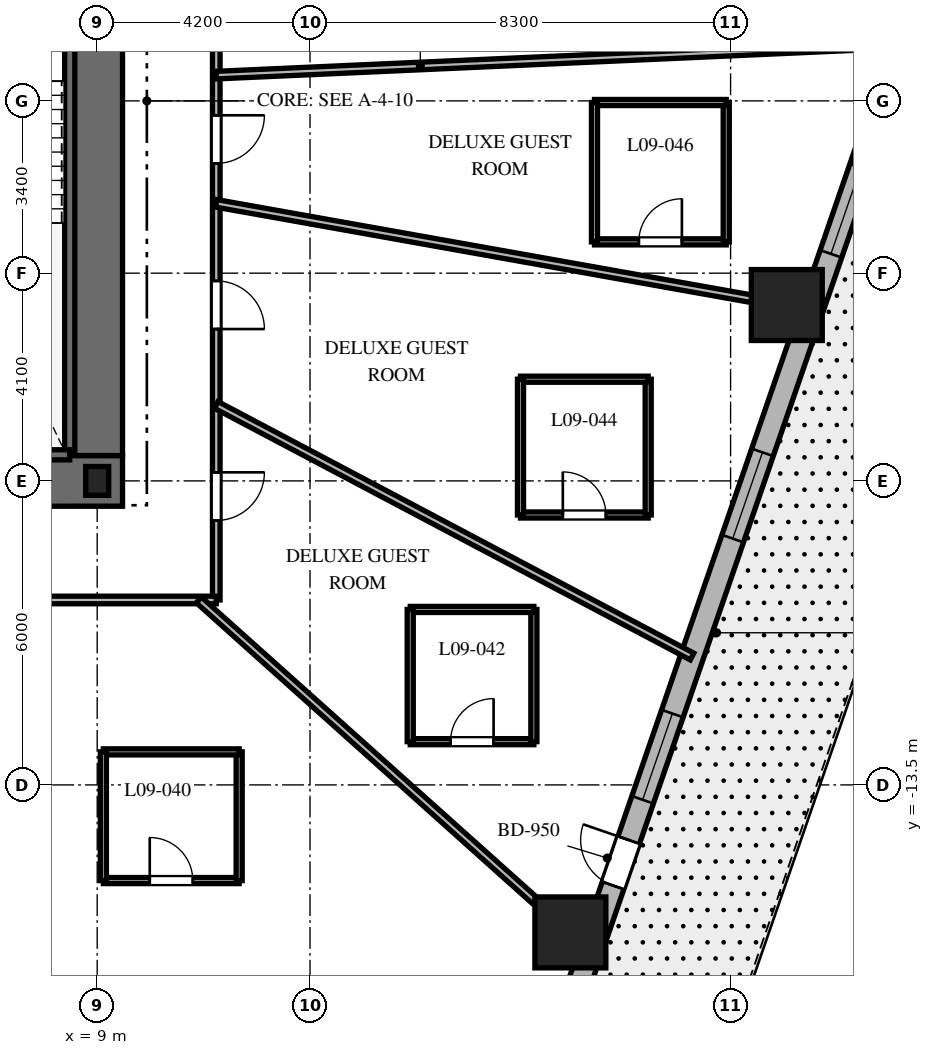
"""IFC4 building model, lengths in metres.
Left out: names, types, materials, properties, quantities, classifications, styles, units other than length and angle.
Written with IfcOpenShell. Run it as: python <this file> out.ifc"""

import sys

from ifc_helpers import new_model, si_unit, direction, frame, frame_2d, origin, origin_2d, place, context, subcontext, project, spatial, rectangle, i_section, extrude, element, fill, save


model = new_model("IFC4")
c1 = context("Model", 3, precision=1e-05, world=origin(), true_north=direction((0.0, 1.0)))
c2 = subcontext(c1, "Body", "Model", "MODEL_VIEW")
j1 = project(units=[si_unit("LENGTHUNIT", "METRE"), si_unit("PLANEANGLEUNIT", "RADIAN")], contexts=[c1])
p1 = place(None, origin())
s1 = spatial("IfcSite", under=j1, at=p1, CompositionType="ELEMENT")
p2 = place(p1, origin())
s2 = spatial("IfcBuilding", under=s1, at=p2, CompositionType="ELEMENT")
p3 = place(p2, frame((0.0, 0.0, 45.3)))
s3 = spatial("IfcBuildingStorey", under=s2, at=p3, CompositionType="ELEMENT", Elevation=45.3)
p4 = place(p3, frame((-9.5, -7.5, 0.0), z_axis=(0.0, 0.0, 1.0), x_axis=(1.0, 0.0, 0.0)))
e1 = element("IfcWall", 1, at=p4, inside=s3, PredefinedType="SHEAR", context=c2, shape_type="SweptSolid", body=[
    extrude(rectangle(XDim=19.0, YDim=1.0, at=frame_2d((9.5, 0.0))), origin(), (0.0, 0.0, 1.0), 3.7),
])
p5 = place(p4, frame((9.55, 0.0, 0.0)))
e2 = element("IfcOpeningElement", 2, at=p5, cuts=e1, PredefinedType="OPENING", context=c2, shape_type="SweptSolid", body=[
    extrude(rectangle(XDim=1.0, YDim=2.15, at=frame_2d((0.5, 1.075))), frame((0.0, 0.51, 0.0), z_axis=(0.0, -1.0, 0.0), x_axis=(1.0, 0.0, 0.0)), (0.0, 0.0, 1.0), 1.02),
])
p6 = place(p3, frame((9.0, -7.0, 0.0), z_axis=(0.0, 0.0, 1.0), x_axis=(0.0, 1.0, 0.0)))
e3 = element("IfcWall", 3, at=p6, inside=s3, PredefinedType="SHEAR", context=c2, shape_type="SweptSolid", body=[
    extrude(rectangle(XDim=14.0, YDim=1.0, at=frame_2d((7.0, 0.0))), origin(), (0.0, 0.0, 1.0), 3.7),
])
p7 = place(p6, frame((10.125, 0.0, 0.0)))
e4 = element("IfcOpeningElement", 4, at=p7, cuts=e3, PredefinedType="OPENING", context=c2, shape_type="SweptSolid", body=[
    extrude(rectangle(XDim=1.05, YDim=2.15, at=frame_2d((0.525, 1.075))), frame((0.0, 0.51, 0.0), z_axis=(0.0, -1.0, 0.0), x_axis=(1.0, 0.0, 0.0)), (0.0, 0.0, 1.0), 1.02),
])
p8 = place(p3, frame((8.458, -6.985, 0.0), z_axis=(0.0, 0.0, 1.0), x_axis=(0.0, 1.0, 0.0)))
e5 = element("IfcWall", 5, at=p8, inside=s3, PredefinedType="SHEAR", context=c2, shape_type="SweptSolid", body=[
    extrude(rectangle(XDim=9.143, YDim=0.2, at=frame_2d((4.572, 0.0))), origin(), (0.0, 0.0, 1.0), 3.7),
])
p9 = place(p3, frame((4.772, -6.985, 0.0), z_axis=(0.0, 0.0, 1.0), x_axis=(1.0, 0.0, 0.0)))
e6 = element("IfcWall", 6, at=p9, inside=s3, PredefinedType="SHEAR", context=c2, shape_type="SweptSolid", body=[
    extrude(rectangle(XDim=3.686, YDim=0.2, at=frame_2d((1.843, 0.0))), origin(), (0.0, 0.0, 1.0), 3.7),
])
p10 = place(p3, frame((9.0, -7.5, 0.0), z_axis=(0.0, 0.0, 1.0), x_axis=(1.0, 0.0, 0.0)))
e7 = element("IfcColumn", 7, at=p10, inside=s3, PredefinedType="COLUMN", context=c2, shape_type="SweptSolid", body=[
    extrude(i_section(OverallWidth=0.454, OverallDepth=0.569, WebThickness=0.078, FlangeThickness=0.125, at=origin_2d()), origin(), (0.0, 0.0, 1.0), 3.7),
])
for number, where, z_axis, x_axis in (
    (8, (18.338, -16.411, 0.0), (0.0, 0.0, 1.0), (1.0, 0.0, 0.0)),
    (9, (22.609, -4.029, 0.0), (0.0, 0.0, 1.0), (1.0, 0.0, 0.0)),
):
    element("IfcColumn", number, at=place(p3, frame(where, z_axis=z_axis, x_axis=x_axis)), inside=s3, PredefinedType="COLUMN", context=c2, shape_type="SweptSolid", body=[
        extrude(rectangle(XDim=1.4, YDim=1.4, at=origin_2d()), origin(), (0.0, 0.0, 1.0), 3.7),
    ])
p11 = place(p3, frame((17.39, -20.678, 0.0), z_axis=(0.0, 0.0, 1.0), x_axis=(0.326068018294, 0.945346310854, 0.0)))
e10 = element("IfcWall", 10, at=p11, inside=s3, PredefinedType="SOLIDWALL", context=c2, shape_type="SweptSolid", body=[
    extrude(rectangle(XDim=21.793, YDim=0.45, at=frame_2d((10.896, 0.0))), origin(), (0.0, 0.0, 1.0), 3.4),
])
p12 = place(p11, frame((5.493, 0.0, 0.0)))
e11 = element("IfcOpeningElement", 11, at=p12, cuts=e10, PredefinedType="OPENING", context=c2, shape_type="SweptSolid", body=[
    extrude(rectangle(XDim=0.95, YDim=2.15, at=frame_2d((0.475, 1.075))), frame((0.0, 0.235, 0.0), z_axis=(0.0, -1.0, 0.0), x_axis=(1.0, 0.0, 0.0)), (0.0, 0.0, 1.0), 0.47),
])
p13 = place(p11, frame((1.26, 0.0, 0.8)))
e12 = element("IfcOpeningElement", 12, at=p13, cuts=e10, PredefinedType="OPENING", context=c2, shape_type="SweptSolid", body=[
    extrude(rectangle(XDim=1.8, YDim=1.8, at=frame_2d((0.9, 0.9))), frame((0.0, 0.235, 0.0), z_axis=(0.0, -1.0, 0.0), x_axis=(1.0, 0.0, 0.0)), (0.0, 0.0, 1.0), 0.47),
])
p14 = place(p11, frame((7.283, 0.0, 0.8)))
e13 = element("IfcOpeningElement", 13, at=p14, cuts=e10, PredefinedType="OPENING", context=c2, shape_type="SweptSolid", body=[
    extrude(rectangle(XDim=1.8, YDim=1.8, at=frame_2d((0.9, 0.9))), frame((0.0, 0.235, 0.0), z_axis=(0.0, -1.0, 0.0), x_axis=(1.0, 0.0, 0.0)), (0.0, 0.0, 1.0), 0.47),
])
p15 = place(p11, frame((12.736, 0.0, 0.8)))
e14 = element("IfcOpeningElement", 14, at=p15, cuts=e10, PredefinedType="OPENING", context=c2, shape_type="SweptSolid", body=[
    extrude(rectangle(XDim=1.8, YDim=1.8, at=frame_2d((0.9, 0.9))), frame((0.0, 0.235, 0.0), z_axis=(0.0, -1.0, 0.0), x_axis=(1.0, 0.0, 0.0)), (0.0, 0.0, 1.0), 0.47),
])
p16 = place(p11, frame((18.68, 0.0, 0.8)))
e15 = element("IfcOpeningElement", 15, at=p16, cuts=e10, PredefinedType="OPENING", context=c2, shape_type="SweptSolid", body=[
    extrude(rectangle(XDim=1.8, YDim=1.8, at=frame_2d((0.9, 0.9))), frame((0.0, 0.235, 0.0), z_axis=(0.0, -1.0, 0.0), x_axis=(1.0, 0.0, 0.0)), (0.0, 0.0, 1.0), 0.47),
])
p17 = place(p3, frame((11.35, 9.85, 0.0), z_axis=(0.0, 0.0, 1.0), x_axis=(0.0, -1.0, 0.0)))
e16 = element("IfcWall", 16, at=p17, inside=s3, PredefinedType="PARTITIONING", context=c2, shape_type="SweptSolid", body=[
    extrude(rectangle(XDim=19.7, YDim=0.15, at=frame_2d((9.85, 0.0))), origin(), (0.0, 0.0, 1.0), 2.84),
])
p18 = place(p17, frame((7.571, 0.0, 0.0)))
e17 = element("IfcOpeningElement", 17, at=p18, cuts=e16, PredefinedType="OPENING", context=c2, shape_type="SweptSolid", body=[
    extrude(rectangle(XDim=0.95, YDim=2.03, at=frame_2d((0.475, 1.015))), frame((0.0, 0.085, 0.0), z_axis=(0.0, -1.0, 0.0), x_axis=(1.0, 0.0, 0.0)), (0.0, 0.0, 1.0), 0.17),
])
p19 = place(p17, frame((3.024, 0.0, 0.0)))
e18 = element("IfcOpeningElement", 18, at=p19, cuts=e16, PredefinedType="OPENING", context=c2, shape_type="SweptSolid", body=[
    extrude(rectangle(XDim=0.95, YDim=2.03, at=frame_2d((0.475, 1.015))), frame((0.0, 0.085, 0.0), z_axis=(0.0, -1.0, 0.0), x_axis=(1.0, 0.0, 0.0)), (0.0, 0.0, 1.0), 0.17),
])
p20 = place(p17, frame((17.181, 0.0, 0.0)))
e19 = element("IfcOpeningElement", 19, at=p20, cuts=e16, PredefinedType="OPENING", context=c2, shape_type="SweptSolid", body=[
    extrude(rectangle(XDim=0.95, YDim=2.03, at=frame_2d((0.475, 1.015))), frame((0.0, 0.085, 0.0), z_axis=(0.0, -1.0, 0.0), x_axis=(1.0, 0.0, 0.0)), (0.0, 0.0, 1.0), 0.17),
])
p21 = place(p17, frame((13.403, 0.0, 0.0)))
e20 = element("IfcOpeningElement", 20, at=p21, cuts=e16, PredefinedType="OPENING", context=c2, shape_type="SweptSolid", body=[
    extrude(rectangle(XDim=0.95, YDim=2.03, at=frame_2d((0.475, 1.015))), frame((0.0, 0.085, 0.0), z_axis=(0.0, -1.0, 0.0), x_axis=(1.0, 0.0, 0.0)), (0.0, 0.0, 1.0), 0.17),
])
p22 = place(p17, frame((10.134, 0.0, 0.0)))
e21 = element("IfcOpeningElement", 21, at=p22, cuts=e16, PredefinedType="OPENING", context=c2, shape_type="SweptSolid", body=[
    extrude(rectangle(XDim=0.95, YDim=2.03, at=frame_2d((0.475, 1.015))), frame((0.0, 0.085, 0.0), z_axis=(0.0, -1.0, 0.0), x_axis=(1.0, 0.0, 0.0)), (0.0, 0.0, 1.0), 0.17),
])
p23 = place(p3, frame((11.35, -9.85, 0.0), z_axis=(0.0, 0.0, 1.0), x_axis=(-1.0, 0.0, 0.0)))
e22 = element("IfcWall", 22, at=p23, inside=s3, PredefinedType="PARTITIONING", context=c2, shape_type="SweptSolid", body=[
    extrude(rectangle(XDim=22.7, YDim=0.15, at=frame_2d((11.35, 0.0))), origin(), (0.0, 0.0, 1.0), 2.84),
])
p24 = place(p23, frame((17.225, 0.0, 0.0)))
e23 = element("IfcOpeningElement", 23, at=p24, cuts=e22, PredefinedType="OPENING", context=c2, shape_type="SweptSolid", body=[
    extrude(rectangle(XDim=0.95, YDim=2.03, at=frame_2d((0.475, 1.015))), frame((0.0, 0.085, 0.0), z_axis=(0.0, -1.0, 0.0), x_axis=(1.0, 0.0, 0.0)), (0.0, 0.0, 1.0), 0.17),
])
p25 = place(p23, frame((12.214, 0.0, 0.0)))
e24 = element("IfcOpeningElement", 24, at=p25, cuts=e22, PredefinedType="OPENING", context=c2, shape_type="SweptSolid", body=[
    extrude(rectangle(XDim=0.95, YDim=2.03, at=frame_2d((0.475, 1.015))), frame((0.0, 0.085, 0.0), z_axis=(0.0, -1.0, 0.0), x_axis=(1.0, 0.0, 0.0)), (0.0, 0.0, 1.0), 0.17),
])
p26 = place(p23, frame((8.725, 0.0, 0.0)))
e25 = element("IfcOpeningElement", 25, at=p26, cuts=e22, PredefinedType="OPENING", context=c2, shape_type="SweptSolid", body=[
    extrude(rectangle(XDim=0.95, YDim=2.03, at=frame_2d((0.475, 1.015))), frame((0.0, 0.085, 0.0), z_axis=(0.0, -1.0, 0.0), x_axis=(1.0, 0.0, 0.0)), (0.0, 0.0, 1.0), 0.17),
])
p27 = place(p23, frame((3.369, 0.0, 0.0)))
e26 = element("IfcOpeningElement", 26, at=p27, cuts=e22, PredefinedType="OPENING", context=c2, shape_type="SweptSolid", body=[
    extrude(rectangle(XDim=0.95, YDim=2.03, at=frame_2d((0.475, 1.015))), frame((0.0, 0.085, 0.0), z_axis=(0.0, -1.0, 0.0), x_axis=(1.0, 0.0, 0.0)), (0.0, 0.0, 1.0), 0.17),
])
p28 = place(p3, frame((11.35, 0.508, 0.0), z_axis=(0.0, 0.0, 1.0), x_axis=(0.998998237556, 0.044749540337, 0.0)))
e27 = element("IfcWall", 27, at=p28, inside=s3, PredefinedType="PARTITIONING", context=c2, shape_type="SweptSolid", body=[
    extrude(rectangle(XDim=13.159, YDim=0.15, at=frame_2d((6.58, 0.0))), origin(), (0.0, 0.0, 1.0), 2.54),
])
p29 = place(p3, frame((3.902, -9.85, 0.0), z_axis=(0.0, 0.0, 1.0), x_axis=(0.36828765711, -0.929711891728, 0.0)))
e28 = element("IfcWall", 28, at=p29, inside=s3, PredefinedType="PARTITIONING", context=c2, shape_type="SweptSolid", body=[
    extrude(rectangle(XDim=14.117, YDim=0.15, at=frame_2d((7.059, 0.0))), origin(), (0.0, 0.0, 1.0), 2.54),
])
p30 = place(p3, frame((11.007, -9.85, 0.0), z_axis=(0.0, 0.0, 1.0), x_axis=(0.745177305978, -0.666866390407, 0.0)))
e29 = element("IfcWall", 29, at=p30, inside=s3, PredefinedType="PARTITIONING", context=c2, shape_type="SweptSolid", body=[
    extrude(rectangle(XDim=10.375, YDim=0.15, at=frame_2d((5.188, 0.0))), origin(), (0.0, 0.0, 1.0), 2.54),
])
p31 = place(p3, frame((11.35, -6.001, 0.0), z_axis=(0.0, 0.0, 1.0), x_axis=(0.884022077319, -0.467445148453, 0.0)))
e30 = element("IfcWall", 30, at=p31, inside=s3, PredefinedType="PARTITIONING", context=c2, shape_type="SweptSolid", body=[
    extrude(rectangle(XDim=10.621, YDim=0.15, at=frame_2d((5.311, 0.0))), origin(), (0.0, 0.0, 1.0), 2.54),
])
p32 = place(p3, frame((11.35, -2.023, 0.0), z_axis=(0.0, 0.0, 1.0), x_axis=(0.984493741877, -0.17541970301, 0.0)))
e31 = element("IfcWall", 31, at=p32, inside=s3, PredefinedType="PARTITIONING", context=c2, shape_type="SweptSolid", body=[
    extrude(rectangle(XDim=11.937, YDim=0.15, at=frame_2d((5.969, 0.0))), origin(), (0.0, 0.0, 1.0), 2.54),
])
p33 = place(p3, frame((9.122, -15.388, 0.0), z_axis=(0.0, 0.0, 1.0), x_axis=(1.0, 0.0, 0.0)))
e32 = element("IfcWall", 32, at=p33, inside=s3, PredefinedType="PARTITIONING", context=c2, shape_type="SweptSolid", body=[
    extrude(rectangle(XDim=2.68, YDim=0.12, at=frame_2d((1.34, 0.0))), origin(), (0.0, 0.0, 1.0), 3.4),
])
p34 = place(p33, frame((0.915, 0.0, 0.0)))
e33 = element("IfcOpeningElement", 33, at=p34, cuts=e32, PredefinedType="OPENING", context=c2, shape_type="SweptSolid", body=[
    extrude(rectangle(XDim=0.85, YDim=2.03, at=frame_2d((0.425, 1.015))), frame((0.0, 0.07, 0.0), z_axis=(0.0, -1.0, 0.0), x_axis=(1.0, 0.0, 0.0)), (0.0, 0.0, 1.0), 0.14),
])
p35 = place(p3, frame((11.802, -15.388, 0.0), z_axis=(0.0, 0.0, 1.0), x_axis=(0.0, 1.0, 0.0)))
e34 = element("IfcWall", 34, at=p35, inside=s3, PredefinedType="PARTITIONING", context=c2, shape_type="SweptSolid", body=[
    extrude(rectangle(XDim=2.54, YDim=0.12, at=frame_2d((1.27, 0.0))), origin(), (0.0, 0.0, 1.0), 3.4),
])
p36 = place(p3, frame((11.802, -12.848, 0.0), z_axis=(0.0, 0.0, 1.0), x_axis=(-1.0, 0.0, 0.0)))
e35 = element("IfcWall", 35, at=p36, inside=s3, PredefinedType="PARTITIONING", context=c2, shape_type="SweptSolid", body=[
    extrude(rectangle(XDim=2.68, YDim=0.12, at=frame_2d((1.34, 0.0))), origin(), (0.0, 0.0, 1.0), 2.972),
])
p37 = place(p3, frame((9.122, -12.848, 0.0), z_axis=(0.0, 0.0, 1.0), x_axis=(0.0, -1.0, 0.0)))
e36 = element("IfcWall", 36, at=p37, inside=s3, PredefinedType="PARTITIONING", context=c2, shape_type="SweptSolid", body=[
    extrude(rectangle(XDim=2.54, YDim=0.12, at=frame_2d((1.27, 0.0))), origin(), (0.0, 0.0, 1.0), 2.84),
])
p38 = place(p3, frame((15.178, -12.647, 0.0), z_axis=(0.0, 0.0, 1.0), x_axis=(1.0, 0.0, 0.0)))
e37 = element("IfcWall", 37, at=p38, inside=s3, PredefinedType="PARTITIONING", context=c2, shape_type="SweptSolid", body=[
    extrude(rectangle(XDim=2.44, YDim=0.12, at=frame_2d((1.22, 0.0))), origin(), (0.0, 0.0, 1.0), 2.972),
])
p39 = place(p38, frame((0.795, 0.0, 0.0)))
e38 = element("IfcOpeningElement", 38, at=p39, cuts=e37, PredefinedType="OPENING", context=c2, shape_type="SweptSolid", body=[
    extrude(rectangle(XDim=0.85, YDim=2.03, at=frame_2d((0.425, 1.015))), frame((0.0, 0.07, 0.0), z_axis=(0.0, -1.0, 0.0), x_axis=(1.0, 0.0, 0.0)), (0.0, 0.0, 1.0), 0.14),
])
p40 = place(p3, frame((17.618, -12.647, 0.0), z_axis=(0.0, 0.0, 1.0), x_axis=(0.0, 1.0, 0.0)))
e39 = element("IfcWall", 39, at=p40, inside=s3, PredefinedType="PARTITIONING", context=c2, shape_type="SweptSolid", body=[
    extrude(rectangle(XDim=2.61, YDim=0.12, at=frame_2d((1.305, 0.0))), origin(), (0.0, 0.0, 1.0), 3.4),
])
p41 = place(p3, frame((17.618, -10.037, 0.0), z_axis=(0.0, 0.0, 1.0), x_axis=(-1.0, 0.0, 0.0)))
e40 = element("IfcWall", 40, at=p41, inside=s3, PredefinedType="PARTITIONING", context=c2, shape_type="SweptSolid", body=[
    extrude(rectangle(XDim=2.44, YDim=0.12, at=frame_2d((1.22, 0.0))), origin(), (0.0, 0.0, 1.0), 2.972),
])
p42 = place(p3, frame((15.178, -10.037, 0.0), z_axis=(0.0, 0.0, 1.0), x_axis=(0.0, -1.0, 0.0)))
e41 = element("IfcWall", 41, at=p42, inside=s3, PredefinedType="PARTITIONING", context=c2, shape_type="SweptSolid", body=[
    extrude(rectangle(XDim=2.61, YDim=0.12, at=frame_2d((1.305, 0.0))), origin(), (0.0, 0.0, 1.0), 3.4),
])
p43 = place(p3, frame((17.354, -8.173, 0.0), z_axis=(0.0, 0.0, 1.0), x_axis=(1.0, 0.0, 0.0)))
e42 = element("IfcWall", 42, at=p43, inside=s3, PredefinedType="PARTITIONING", context=c2, shape_type="SweptSolid", body=[
    extrude(rectangle(XDim=2.52, YDim=0.12, at=frame_2d((1.26, 0.0))), origin(), (0.0, 0.0, 1.0), 3.4),
])
p44 = place(p43, frame((0.835, 0.0, 0.0)))
e43 = element("IfcOpeningElement", 43, at=p44, cuts=e42, PredefinedType="OPENING", context=c2, shape_type="SweptSolid", body=[
    extrude(rectangle(XDim=0.85, YDim=2.03, at=frame_2d((0.425, 1.015))), frame((0.0, 0.07, 0.0), z_axis=(0.0, -1.0, 0.0), x_axis=(1.0, 0.0, 0.0)), (0.0, 0.0, 1.0), 0.14),
])
p45 = place(p3, frame((19.874, -8.173, 0.0), z_axis=(0.0, 0.0, 1.0), x_axis=(0.0, 1.0, 0.0)))
e44 = element("IfcWall", 44, at=p45, inside=s3, PredefinedType="PARTITIONING", context=c2, shape_type="SweptSolid", body=[
    extrude(rectangle(XDim=2.68, YDim=0.12, at=frame_2d((1.34, 0.0))), origin(), (0.0, 0.0, 1.0), 3.4),
])
p46 = place(p3, frame((19.874, -5.493, 0.0), z_axis=(0.0, 0.0, 1.0), x_axis=(-1.0, 0.0, 0.0)))
e45 = element("IfcWall", 45, at=p46, inside=s3, PredefinedType="PARTITIONING", context=c2, shape_type="SweptSolid", body=[
    extrude(rectangle(XDim=2.52, YDim=0.12, at=frame_2d((1.26, 0.0))), origin(), (0.0, 0.0, 1.0), 2.84),
])
p47 = place(p3, frame((17.354, -5.493, 0.0), z_axis=(0.0, 0.0, 1.0), x_axis=(0.0, -1.0, 0.0)))
e46 = element("IfcWall", 46, at=p47, inside=s3, PredefinedType="PARTITIONING", context=c2, shape_type="SweptSolid", body=[
    extrude(rectangle(XDim=2.68, YDim=0.12, at=frame_2d((1.34, 0.0))), origin(), (0.0, 0.0, 1.0), 2.972),
])
p48 = place(p3, frame((18.814, -2.782, 0.0), z_axis=(0.0, 0.0, 1.0), x_axis=(1.0, 0.0, 0.0)))
e47 = element("IfcWall", 47, at=p48, inside=s3, PredefinedType="PARTITIONING", context=c2, shape_type="SweptSolid", body=[
    extrude(rectangle(XDim=2.6, YDim=0.12, at=frame_2d((1.3, 0.0))), origin(), (0.0, 0.0, 1.0), 3.4),
])
p49 = place(p48, frame((0.875, 0.0, 0.0)))
e48 = element("IfcOpeningElement", 48, at=p49, cuts=e47, PredefinedType="OPENING", context=c2, shape_type="SweptSolid", body=[
    extrude(rectangle(XDim=0.85, YDim=2.03, at=frame_2d((0.425, 1.015))), frame((0.0, 0.07, 0.0), z_axis=(0.0, -1.0, 0.0), x_axis=(1.0, 0.0, 0.0)), (0.0, 0.0, 1.0), 0.14),
])
p50 = place(p3, frame((21.414, -2.782, 0.0), z_axis=(0.0, 0.0, 1.0), x_axis=(0.0, 1.0, 0.0)))
e49 = element("IfcWall", 49, at=p50, inside=s3, PredefinedType="PARTITIONING", context=c2, shape_type="SweptSolid", body=[
    extrude(rectangle(XDim=2.75, YDim=0.12, at=frame_2d((1.375, 0.0))), origin(), (0.0, 0.0, 1.0), 3.4),
])
p51 = place(p3, frame((21.414, -0.032, 0.0), z_axis=(0.0, 0.0, 1.0), x_axis=(-1.0, 0.0, 0.0)))
e50 = element("IfcWall", 50, at=p51, inside=s3, PredefinedType="PARTITIONING", context=c2, shape_type="SweptSolid", body=[
    extrude(rectangle(XDim=2.6, YDim=0.12, at=frame_2d((1.3, 0.0))), origin(), (0.0, 0.0, 1.0), 3.4),
])
p52 = place(p3, frame((18.814, -0.032, 0.0), z_axis=(0.0, 0.0, 1.0), x_axis=(0.0, -1.0, 0.0)))
e51 = element("IfcWall", 51, at=p52, inside=s3, PredefinedType="PARTITIONING", context=c2, shape_type="SweptSolid", body=[
    extrude(rectangle(XDim=2.75, YDim=0.12, at=frame_2d((1.375, 0.0))), origin(), (0.0, 0.0, 1.0), 3.4),
])
p53 = place(p12, origin())
e52 = element("IfcDoor", 52, at=p53, inside=s3, OperationType="SINGLE_SWING_RIGHT", PredefinedType="DOOR", context=c2, shape_type="SweptSolid", body=[
    extrude(rectangle(XDim=0.95, YDim=2.15, at=frame_2d((0.475, 1.075))), frame((0.0, 0.025, 0.0), z_axis=(0.0, -1.0, 0.0), x_axis=(1.0, 0.0, 0.0)), (0.0, 0.0, 1.0), 0.05),
])
fill(e11, e52)
p54 = place(p14, origin())
e53 = element("IfcWindow", 53, at=p54, inside=s3, PartitioningType="SINGLE_PANEL", PredefinedType="WINDOW", context=c2, shape_type="SweptSolid", body=[
    extrude(rectangle(XDim=1.8, YDim=1.8, at=frame_2d((0.9, 0.9))), frame((0.0, 0.03, 0.0), z_axis=(0.0, -1.0, 0.0), x_axis=(1.0, 0.0, 0.0)), (0.0, 0.0, 1.0), 0.06),
])
fill(e13, e53)
p55 = place(p15, origin())
e54 = element("IfcWindow", 54, at=p55, inside=s3, PartitioningType="SINGLE_PANEL", PredefinedType="WINDOW", context=c2, shape_type="SweptSolid", body=[
    extrude(rectangle(XDim=1.8, YDim=1.8, at=frame_2d((0.9, 0.9))), frame((0.0, 0.03, 0.0), z_axis=(0.0, -1.0, 0.0), x_axis=(1.0, 0.0, 0.0)), (0.0, 0.0, 1.0), 0.06),
])
fill(e14, e54)
p56 = place(p16, origin())
e55 = element("IfcWindow", 55, at=p56, inside=s3, PartitioningType="SINGLE_PANEL", PredefinedType="WINDOW", context=c2, shape_type="SweptSolid", body=[
    extrude(rectangle(XDim=1.8, YDim=1.8, at=frame_2d((0.9, 0.9))), frame((0.0, 0.03, 0.0), z_axis=(0.0, -1.0, 0.0), x_axis=(1.0, 0.0, 0.0)), (0.0, 0.0, 1.0), 0.06),
])
fill(e15, e55)
p57 = place(p34, origin())
e56 = element("IfcDoor", 56, at=p57, inside=s3, OperationType="SINGLE_SWING_LEFT", PredefinedType="DOOR", context=c2, shape_type="SweptSolid", body=[
    extrude(rectangle(XDim=0.85, YDim=2.03, at=frame_2d((0.425, 1.015))), frame((0.0, 0.025, 0.0), z_axis=(0.0, -1.0, 0.0), x_axis=(1.0, 0.0, 0.0)), (0.0, 0.0, 1.0), 0.05),
])
fill(e33, e56)
p58 = place(p20, origin())
e57 = element("IfcDoor", 57, at=p58, inside=s3, OperationType="SINGLE_SWING_LEFT", PredefinedType="DOOR", context=c2, shape_type="SweptSolid", body=[
    extrude(rectangle(XDim=0.95, YDim=2.03, at=frame_2d((0.475, 1.015))), frame((0.0, 0.025, 0.0), z_axis=(0.0, -1.0, 0.0), x_axis=(1.0, 0.0, 0.0)), (0.0, 0.0, 1.0), 0.05),
])
fill(e19, e57)
p59 = place(p39, origin())
e58 = element("IfcDoor", 58, at=p59, inside=s3, OperationType="SINGLE_SWING_RIGHT", PredefinedType="DOOR", context=c2, shape_type="SweptSolid", body=[
    extrude(rectangle(XDim=0.85, YDim=2.03, at=frame_2d((0.425, 1.015))), frame((0.0, 0.025, 0.0), z_axis=(0.0, -1.0, 0.0), x_axis=(1.0, 0.0, 0.0)), (0.0, 0.0, 1.0), 0.05),
])
fill(e38, e58)
p60 = place(p21, origin())
e59 = element("IfcDoor", 59, at=p60, inside=s3, OperationType="SINGLE_SWING_RIGHT", PredefinedType="DOOR", context=c2, shape_type="SweptSolid", body=[
    extrude(rectangle(XDim=0.95, YDim=2.03, at=frame_2d((0.475, 1.015))), frame((0.0, 0.025, 0.0), z_axis=(0.0, -1.0, 0.0), x_axis=(1.0, 0.0, 0.0)), (0.0, 0.0, 1.0), 0.05),
])
fill(e20, e59)
p61 = place(p44, origin())
e60 = element("IfcDoor", 60, at=p61, inside=s3, OperationType="SINGLE_SWING_LEFT", PredefinedType="DOOR", context=c2, shape_type="SweptSolid", body=[
    extrude(rectangle(XDim=0.85, YDim=2.03, at=frame_2d((0.425, 1.015))), frame((0.0, 0.025, 0.0), z_axis=(0.0, -1.0, 0.0), x_axis=(1.0, 0.0, 0.0)), (0.0, 0.0, 1.0), 0.05),
])
fill(e43, e60)
p62 = place(p22, origin())
e61 = element("IfcDoor", 61, at=p62, inside=s3, OperationType="SINGLE_SWING_LEFT", PredefinedType="DOOR", context=c2, shape_type="SweptSolid", body=[
    extrude(rectangle(XDim=0.95, YDim=2.03, at=frame_2d((0.475, 1.015))), frame((0.0, 0.025, 0.0), z_axis=(0.0, -1.0, 0.0), x_axis=(1.0, 0.0, 0.0)), (0.0, 0.0, 1.0), 0.05),
])
fill(e21, e61)
p63 = place(p49, origin())
e62 = element("IfcDoor", 62, at=p63, inside=s3, OperationType="SINGLE_SWING_RIGHT", PredefinedType="DOOR", context=c2, shape_type="SweptSolid", body=[
    extrude(rectangle(XDim=0.85, YDim=2.03, at=frame_2d((0.425, 1.015))), frame((0.0, 0.025, 0.0), z_axis=(0.0, -1.0, 0.0), x_axis=(1.0, 0.0, 0.0)), (0.0, 0.0, 1.0), 0.05),
])
fill(e48, e62)
save(model, sys.argv[1])
